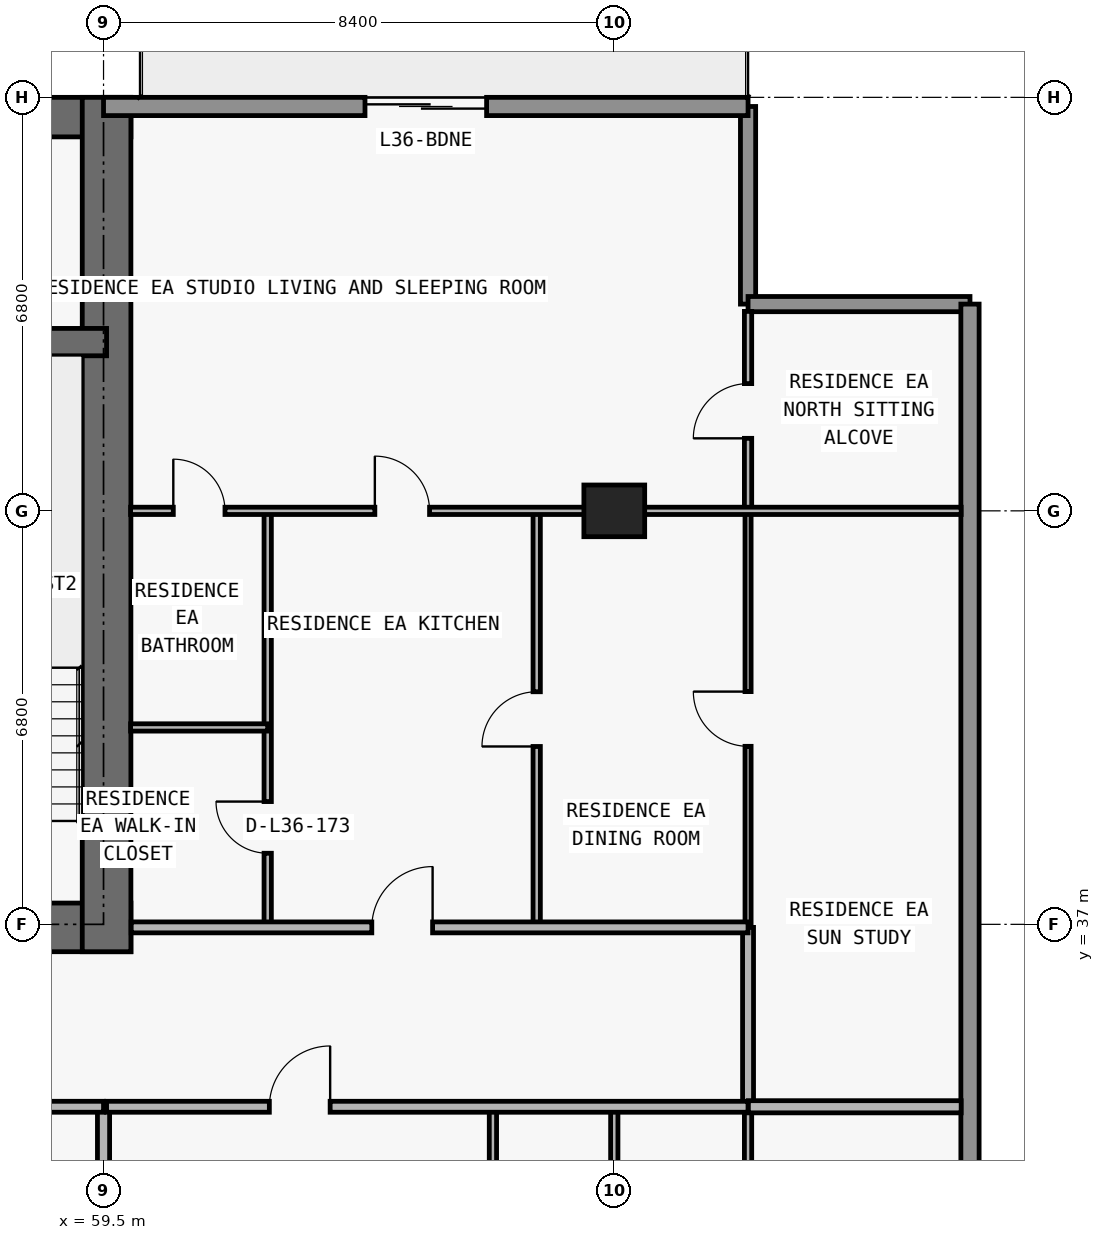
"""IFC4 building model, lengths in metres.
Left out: names, types, materials, properties, quantities, classifications, styles, units other than length and angle.
Written with IfcOpenShell. Run it as: python <this file> out.ifc"""

import sys

from ifc_helpers import new_model, si_unit, direction, frame, frame_2d, origin, origin_2d, place, context, subcontext, project, spatial, rectangle, extrude, element, fill, save


model = new_model("IFC4")
c1 = context("Model", 3, precision=1e-05, world=origin(), true_north=direction((0.0, 1.0)))
c2 = subcontext(c1, "Body", "Model", "MODEL_VIEW")
j1 = project(units=[si_unit("LENGTHUNIT", "METRE"), si_unit("PLANEANGLEUNIT", "RADIAN")], contexts=[c1])
p1 = place(None, origin())
s1 = spatial("IfcSite", under=j1, at=p1, CompositionType="ELEMENT")
p2 = place(p1, origin())
s2 = spatial("IfcBuilding", under=s1, at=p2, CompositionType="ELEMENT")
p3 = place(p2, frame((0.0, 0.0, 132.3)))
s3 = spatial("IfcBuildingStorey", under=s2, at=p3, CompositionType="ELEMENT", Elevation=132.3)
p4 = place(p3, frame((67.9, 43.8, 0.0), z_axis=(0.0, 0.0, 1.0), x_axis=(1.0, 0.0, 0.0)))
e1 = element("IfcColumn", 1, at=p4, inside=s3, PredefinedType="COLUMN", context=c2, shape_type="SweptSolid", body=[
    extrude(rectangle(XDim=1.0, YDim=0.85, at=origin_2d()), origin(), (0.0, 0.0, 1.0), 3.05),
])
p5 = place(p3, frame((17.85, 36.95, 0.0), z_axis=(0.0, 0.0, 1.0), x_axis=(1.0, 0.0, 0.0)))
e2 = element("IfcWall", 2, at=p5, inside=s3, PredefinedType="SHEAR", context=c2, shape_type="SweptSolid", body=[
    extrude(rectangle(XDim=42.1, YDim=0.8, at=frame_2d((21.05, 0.0))), origin(), (0.0, 0.0, 1.0), 3.05),
])
p6 = place(p5, frame((14.45, 0.0, 0.0)))
e3 = element("IfcOpeningElement", 3, at=p6, cuts=e2, PredefinedType="OPENING", context=c2, shape_type="SweptSolid", body=[
    extrude(rectangle(XDim=1.1, YDim=2.15, at=frame_2d((0.55, 1.075))), frame((0.0, 0.41, 0.0), z_axis=(0.0, -1.0, 0.0), x_axis=(1.0, 0.0, 0.0)), (0.0, 0.0, 1.0), 0.82),
])
p7 = place(p5, frame((6.3, 0.0, 0.0)))
e4 = element("IfcOpeningElement", 4, at=p7, cuts=e2, PredefinedType="OPENING", context=c2, shape_type="SweptSolid", body=[
    extrude(rectangle(XDim=1.05, YDim=2.15, at=frame_2d((0.525, 1.075))), frame((0.0, 0.41, 0.0), z_axis=(0.0, -1.0, 0.0), x_axis=(1.0, 0.0, 0.0)), (0.0, 0.0, 1.0), 0.82),
])
p8 = place(p5, frame((34.8, 0.0, 0.0)))
e5 = element("IfcOpeningElement", 5, at=p8, cuts=e2, PredefinedType="OPENING", context=c2, shape_type="SweptSolid", body=[
    extrude(rectangle(XDim=1.05, YDim=2.15, at=frame_2d((0.525, 1.075))), frame((0.0, 0.41, 0.0), z_axis=(0.0, -1.0, 0.0), x_axis=(1.0, 0.0, 0.0)), (0.0, 0.0, 1.0), 0.82),
])
p9 = place(p5, frame((10.913, 0.0, 0.0)))
e6 = element("IfcOpeningElement", 6, at=p9, cuts=e2, PredefinedType="OPENING", context=c2, shape_type="SweptSolid", body=[
    extrude(rectangle(XDim=1.05, YDim=2.15, at=frame_2d((0.525, 1.075))), frame((0.0, 0.41, 0.0), z_axis=(0.0, -1.0, 0.0), x_axis=(1.0, 0.0, 0.0)), (0.0, 0.0, 1.0), 0.82),
])
p10 = place(p5, frame((24.15, 0.0, 0.0)))
e7 = element("IfcOpeningElement", 7, at=p10, cuts=e2, PredefinedType="OPENING", context=c2, shape_type="SweptSolid", body=[
    extrude(rectangle(XDim=1.05, YDim=2.15, at=frame_2d((0.525, 1.075))), frame((0.0, 0.41, 0.0), z_axis=(0.0, -1.0, 0.0), x_axis=(1.0, 0.0, 0.0)), (0.0, 0.0, 1.0), 0.82),
])
p11 = place(p3, frame((17.85, 50.275, 0.0), z_axis=(0.0, 0.0, 1.0), x_axis=(1.0, 0.0, 0.0)))
e8 = element("IfcWall", 8, at=p11, inside=s3, PredefinedType="SHEAR", context=c2, shape_type="SweptSolid", body=[
    extrude(rectangle(XDim=42.1, YDim=0.65, at=frame_2d((21.05, 0.0))), origin(), (0.0, 0.0, 1.0), 3.05),
])
p12 = place(p3, frame((59.55, 36.55, 0.0), z_axis=(0.0, 0.0, 1.0), x_axis=(0.0, 1.0, 0.0)))
e9 = element("IfcWall", 9, at=p12, inside=s3, PredefinedType="SHEAR", context=c2, shape_type="SweptSolid", body=[
    extrude(rectangle(XDim=14.05, YDim=0.8, at=frame_2d((7.025, 0.0))), origin(), (0.0, 0.0, 1.0), 3.05),
])
p13 = place(p3, frame((18.25, 46.575, 0.0), z_axis=(0.0, 0.0, 1.0), x_axis=(1.0, 0.0, 0.0)))
e10 = element("IfcWall", 10, at=p13, inside=s3, PredefinedType="SHEAR", context=c2, shape_type="SweptSolid", body=[
    extrude(rectangle(XDim=41.3, YDim=0.45, at=frame_2d((20.65, 0.0))), origin(), (0.0, 0.0, 1.0), 3.05),
])
p14 = place(p13, frame((7.625, 0.0, 0.0)))
e11 = element("IfcOpeningElement", 11, at=p14, cuts=e10, PredefinedType="OPENING", context=c2, shape_type="SweptSolid", body=[
    extrude(rectangle(XDim=1.05, YDim=2.15, at=frame_2d((0.525, 1.075))), frame((0.0, 0.235, 0.0), z_axis=(0.0, -1.0, 0.0), x_axis=(1.0, 0.0, 0.0)), (0.0, 0.0, 1.0), 0.47),
])
p15 = place(p13, frame((32.675, 0.0, 0.0)))
e12 = element("IfcOpeningElement", 12, at=p15, cuts=e10, PredefinedType="OPENING", context=c2, shape_type="SweptSolid", body=[
    extrude(rectangle(XDim=1.05, YDim=2.15, at=frame_2d((0.525, 1.075))), frame((0.0, 0.235, 0.0), z_axis=(0.0, -1.0, 0.0), x_axis=(1.0, 0.0, 0.0)), (0.0, 0.0, 1.0), 0.47),
])
p16 = place(p3, frame((70.1, 50.45, 0.0), z_axis=(0.0, 0.0, 1.0), x_axis=(0.0, -1.0, 0.0)))
e13 = element("IfcWall", 13, at=p16, inside=s3, PredefinedType="ELEMENTEDWALL", context=c2, shape_type="SweptSolid", body=[
    extrude(rectangle(XDim=3.25, YDim=0.25, at=frame_2d((1.625, 0.0))), origin(), (0.0, 0.0, 1.0), 3.05),
])
p17 = place(p3, frame((70.1, 47.2, 0.0), z_axis=(0.0, 0.0, 1.0), x_axis=(1.0, 0.0, 0.0)))
e14 = element("IfcWall", 14, at=p17, inside=s3, PredefinedType="ELEMENTEDWALL", context=c2, shape_type="SweptSolid", body=[
    extrude(rectangle(XDim=3.65, YDim=0.25, at=frame_2d((1.825, 0.0))), origin(), (0.0, 0.0, 1.0), 3.05),
])
p18 = place(p3, frame((73.75, 47.2, 0.0), z_axis=(0.0, 0.0, 1.0), x_axis=(0.0, -1.0, 0.0)))
e15 = element("IfcWall", 15, at=p18, inside=s3, PredefinedType="STANDARD", context=c2, shape_type="SweptSolid", body=[
    extrude(rectangle(XDim=19.2, YDim=0.3, at=frame_2d((9.6, 0.0))), origin(), (0.0, 0.0, 1.0), 3.05),
])
p19 = place(p3, frame((59.5, 50.45, 0.0), z_axis=(0.0, 0.0, 1.0), x_axis=(1.0, 0.0, 0.0)))
e16 = element("IfcWall", 16, at=p19, inside=s3, PredefinedType="STANDARD", context=c2, shape_type="SweptSolid", body=[
    extrude(rectangle(XDim=10.6, YDim=0.3, at=frame_2d((5.3, 0.0))), origin(), (0.0, 0.0, 1.0), 3.05),
])
p20 = place(p19, frame((4.3, 0.0, 0.0)))
e17 = element("IfcOpeningElement", 17, at=p20, cuts=e16, PredefinedType="OPENING", context=c2, shape_type="SweptSolid", body=[
    extrude(rectangle(XDim=2.0, YDim=2.3, at=frame_2d((1.0, 1.15))), frame((0.0, 0.16, 0.0), z_axis=(0.0, -1.0, 0.0), x_axis=(1.0, 0.0, 0.0)), (0.0, 0.0, 1.0), 0.32),
])
p21 = place(p3, frame((59.5, 28.84, 0.0), z_axis=(0.0, 0.0, 1.0), x_axis=(0.0, 1.0, 0.0)))
e18 = element("IfcWall", 18, at=p21, inside=s3, PredefinedType="PARTITIONING", context=c2, shape_type="SweptSolid", body=[
    extrude(rectangle(XDim=5.16, YDim=0.2, at=frame_2d((2.58, 0.0))), origin(), (0.0, 0.0, 1.0), 2.174),
])
p22 = place(p3, frame((62.2, 36.95, 0.0), z_axis=(0.0, 0.0, 1.0), x_axis=(0.0, 1.0, 0.0)))
e19 = element("IfcWall", 19, at=p22, inside=s3, PredefinedType="PARTITIONING", context=c2, shape_type="SweptSolid", body=[
    extrude(rectangle(XDim=6.85, YDim=0.12, at=frame_2d((3.425, 0.0))), origin(), (0.0, 0.0, 1.0), 2.499),
])
p23 = place(p22, frame((1.219, 0.0, 0.0)))
e20 = element("IfcOpeningElement", 20, at=p23, cuts=e19, PredefinedType="OPENING", context=c2, shape_type="SweptSolid", body=[
    extrude(rectangle(XDim=0.85, YDim=2.1, at=frame_2d((0.425, 1.05))), frame((0.0, 0.07, 0.0), z_axis=(0.0, -1.0, 0.0), x_axis=(1.0, 0.0, 0.0)), (0.0, 0.0, 1.0), 0.14),
])
p24 = place(p3, frame((65.904, 28.84, 0.0), z_axis=(0.0, 0.0, 1.0), x_axis=(0.0, 1.0, 0.0)))
e21 = element("IfcWall", 21, at=p24, inside=s3, PredefinedType="PARTITIONING", context=c2, shape_type="SweptSolid", body=[
    extrude(rectangle(XDim=5.16, YDim=0.12, at=frame_2d((2.58, 0.0))), origin(), (0.0, 0.0, 1.0), 3.05),
])
p25 = place(p24, frame((2.155, 0.0, 0.0)))
e22 = element("IfcOpeningElement", 22, at=p25, cuts=e21, PredefinedType="OPENING", context=c2, shape_type="SweptSolid", body=[
    extrude(rectangle(XDim=0.85, YDim=2.1, at=frame_2d((0.425, 1.05))), frame((0.0, 0.07, 0.0), z_axis=(0.0, -1.0, 0.0), x_axis=(1.0, 0.0, 0.0)), (0.0, 0.0, 1.0), 0.14),
])
p26 = place(p3, frame((66.624, 36.95, 0.0), z_axis=(0.0, 0.0, 1.0), x_axis=(0.0, 1.0, 0.0)))
e23 = element("IfcWall", 23, at=p26, inside=s3, PredefinedType="PARTITIONING", context=c2, shape_type="SweptSolid", body=[
    extrude(rectangle(XDim=6.85, YDim=0.12, at=frame_2d((3.425, 0.0))), origin(), (0.0, 0.0, 1.0), 3.05),
])
p27 = place(p26, frame((2.975, 0.0, 0.0)))
e24 = element("IfcOpeningElement", 24, at=p27, cuts=e23, PredefinedType="OPENING", context=c2, shape_type="SweptSolid", body=[
    extrude(rectangle(XDim=0.9, YDim=2.15, at=frame_2d((0.45, 1.075))), frame((0.0, 0.07, 0.0), z_axis=(0.0, -1.0, 0.0), x_axis=(1.0, 0.0, 0.0)), (0.0, 0.0, 1.0), 0.14),
])
p28 = place(p3, frame((67.9, 28.84, 0.0), z_axis=(0.0, 0.0, 1.0), x_axis=(0.0, 1.0, 0.0)))
e25 = element("IfcWall", 25, at=p28, inside=s3, PredefinedType="PARTITIONING", context=c2, shape_type="SweptSolid", body=[
    extrude(rectangle(XDim=5.16, YDim=0.12, at=frame_2d((2.58, 0.0))), origin(), (0.0, 0.0, 1.0), 2.174),
])
p29 = place(p3, frame((70.1, 28.84, 0.0), z_axis=(0.0, 0.0, 1.0), x_axis=(0.0, 1.0, 0.0)))
e26 = element("IfcWall", 26, at=p29, inside=s3, PredefinedType="PARTITIONING", context=c2, shape_type="SweptSolid", body=[
    extrude(rectangle(XDim=5.16, YDim=0.12, at=frame_2d((2.58, 0.0))), origin(), (0.0, 0.0, 1.0), 3.05),
])
p30 = place(p3, frame((70.1, 34.005, 0.0), z_axis=(0.0, 0.0, 1.0), x_axis=(0.0, 1.0, 0.0)))
e27 = element("IfcWall", 27, at=p30, inside=s3, PredefinedType="PARTITIONING", context=c2, shape_type="SweptSolid", body=[
    extrude(rectangle(XDim=2.945, YDim=0.18, at=frame_2d((1.473, 0.0))), origin(), (0.0, 0.0, 1.0), 3.05),
])
p31 = place(p3, frame((70.1, 36.955, 0.0), z_axis=(0.0, 0.0, 1.0), x_axis=(0.0, 1.0, 0.0)))
e28 = element("IfcWall", 28, at=p31, inside=s3, PredefinedType="MOVABLE", context=c2, shape_type="SweptSolid", body=[
    extrude(rectangle(XDim=6.845, YDim=0.1, at=frame_2d((3.422, 0.0))), origin(), (0.0, 0.0, 1.0), 3.05),
])
p32 = place(p31, frame((2.972, 0.0, 0.0)))
e29 = element("IfcOpeningElement", 29, at=p32, cuts=e28, PredefinedType="OPENING", context=c2, shape_type="SweptSolid", body=[
    extrude(rectangle(XDim=0.9, YDim=2.15, at=frame_2d((0.45, 1.075))), frame((0.0, 0.06, 0.0), z_axis=(0.0, -1.0, 0.0), x_axis=(1.0, 0.0, 0.0)), (0.0, 0.0, 1.0), 0.12),
])
p33 = place(p3, frame((70.1, 43.805, 0.0), z_axis=(0.0, 0.0, 1.0), x_axis=(0.0, 1.0, 0.0)))
e30 = element("IfcWall", 30, at=p33, inside=s3, PredefinedType="PARTITIONING", context=c2, shape_type="SweptSolid", body=[
    extrude(rectangle(XDim=3.275, YDim=0.12, at=frame_2d((1.638, 0.0))), origin(), (0.0, 0.0, 1.0), 3.05),
])
p34 = place(p33, frame((1.188, 0.0, 0.0)))
e31 = element("IfcOpeningElement", 31, at=p34, cuts=e30, PredefinedType="OPENING", context=c2, shape_type="SweptSolid", body=[
    extrude(rectangle(XDim=0.9, YDim=2.15, at=frame_2d((0.45, 1.075))), frame((0.0, 0.07, 0.0), z_axis=(0.0, -1.0, 0.0), x_axis=(1.0, 0.0, 0.0)), (0.0, 0.0, 1.0), 0.14),
])
p35 = place(p3, frame((55.9, 34.0, 0.0), z_axis=(0.0, 0.0, 1.0), x_axis=(1.0, 0.0, 0.0)))
e32 = element("IfcWall", 32, at=p35, inside=s3, PredefinedType="PARTITIONING", context=c2, shape_type="SweptSolid", body=[
    extrude(rectangle(XDim=3.6, YDim=0.18, at=frame_2d((1.8, 0.0))), origin(), (0.0, 0.0, 1.0), 3.05),
])
p36 = place(p3, frame((59.55, 34.0, 0.0), z_axis=(0.0, 0.0, 1.0), x_axis=(1.0, 0.0, 0.0)))
e33 = element("IfcWall", 33, at=p36, inside=s3, PredefinedType="PARTITIONING", context=c2, shape_type="SweptSolid", body=[
    extrude(rectangle(XDim=10.55, YDim=0.18, at=frame_2d((5.275, 0.0))), origin(), (0.0, 0.0, 1.0), 3.05),
])
p37 = place(p36, frame((2.677, 0.0, 0.0)))
e34 = element("IfcOpeningElement", 34, at=p37, cuts=e33, PredefinedType="OPENING", context=c2, shape_type="SweptSolid", body=[
    extrude(rectangle(XDim=1.0, YDim=2.2, at=frame_2d((0.5, 1.1))), frame((0.0, 0.1, 0.0), z_axis=(0.0, -1.0, 0.0), x_axis=(1.0, 0.0, 0.0)), (0.0, 0.0, 1.0), 0.2),
])
p38 = place(p3, frame((70.105, 34.0, 0.0), z_axis=(0.0, 0.0, 1.0), x_axis=(1.0, 0.0, 0.0)))
e35 = element("IfcWall", 35, at=p38, inside=s3, PredefinedType="PARTITIONING", context=c2, shape_type="SweptSolid", body=[
    extrude(rectangle(XDim=3.5, YDim=0.2, at=frame_2d((1.75, 0.0))), origin(), (0.0, 0.0, 1.0), 3.05),
])
p39 = place(p3, frame((59.955, 36.95, 0.0), z_axis=(0.0, 0.0, 1.0), x_axis=(1.0, 0.0, 0.0)))
e36 = element("IfcWall", 36, at=p39, inside=s3, PredefinedType="PARTITIONING", context=c2, shape_type="SweptSolid", body=[
    extrude(rectangle(XDim=10.145, YDim=0.18, at=frame_2d((5.073, 0.0))), origin(), (0.0, 0.0, 1.0), 3.05),
])
p40 = place(p39, frame((3.957, 0.0, 0.0)))
e37 = element("IfcOpeningElement", 37, at=p40, cuts=e36, PredefinedType="OPENING", context=c2, shape_type="SweptSolid", body=[
    extrude(rectangle(XDim=1.0, YDim=2.2, at=frame_2d((0.5, 1.1))), frame((0.0, 0.1, 0.0), z_axis=(0.0, -1.0, 0.0), x_axis=(1.0, 0.0, 0.0)), (0.0, 0.0, 1.0), 0.2),
])
p41 = place(p3, frame((59.945, 40.238, 0.0), z_axis=(0.0, 0.0, 1.0), x_axis=(1.0, 0.0, 0.0)))
e38 = element("IfcWall", 38, at=p41, inside=s3, PredefinedType="PARTITIONING", context=c2, shape_type="SweptSolid", body=[
    extrude(rectangle(XDim=2.255, YDim=0.12, at=frame_2d((1.127, 0.0))), origin(), (0.0, 0.0, 1.0), 3.05),
])
p42 = place(p3, frame((59.945, 43.8, 0.0), z_axis=(0.0, 0.0, 1.0), x_axis=(1.0, 0.0, 0.0)))
e39 = element("IfcWall", 39, at=p42, inside=s3, PredefinedType="PARTITIONING", context=c2, shape_type="SweptSolid", body=[
    extrude(rectangle(XDim=13.66, YDim=0.12, at=frame_2d((6.83, 0.0))), origin(), (0.0, 0.0, 1.0), 2.339),
])
p43 = place(p42, frame((4.017, 0.0, 0.0)))
e40 = element("IfcOpeningElement", 40, at=p43, cuts=e39, PredefinedType="OPENING", context=c2, shape_type="SweptSolid", body=[
    extrude(rectangle(XDim=0.9, YDim=2.15, at=frame_2d((0.45, 1.075))), frame((0.0, 0.07, 0.0), z_axis=(0.0, -1.0, 0.0), x_axis=(1.0, 0.0, 0.0)), (0.0, 0.0, 1.0), 0.14),
])
p44 = place(p42, frame((0.702, 0.0, 0.0)))
e41 = element("IfcOpeningElement", 41, at=p44, cuts=e39, PredefinedType="OPENING", context=c2, shape_type="SweptSolid", body=[
    extrude(rectangle(XDim=0.85, YDim=2.1, at=frame_2d((0.425, 1.05))), frame((0.0, 0.07, 0.0), z_axis=(0.0, -1.0, 0.0), x_axis=(1.0, 0.0, 0.0)), (0.0, 0.0, 1.0), 0.14),
])
p45 = place(p20, origin())
e42 = element("IfcDoor", 42, at=p45, inside=s3, OperationType="DOUBLE_DOOR_SLIDING", PredefinedType="DOOR", context=c2, shape_type="SweptSolid", body=[
    extrude(rectangle(XDim=2.0, YDim=2.3, at=frame_2d((1.0, 1.15))), frame((0.0, 0.025, 0.0), z_axis=(0.0, -1.0, 0.0), x_axis=(1.0, 0.0, 0.0)), (0.0, 0.0, 1.0), 0.05),
])
fill(e17, e42)
p46 = place(p37, origin())
e43 = element("IfcDoor", 43, at=p46, inside=s3, OperationType="SINGLE_SWING_RIGHT", PredefinedType="DOOR", context=c2, shape_type="SweptSolid", body=[
    extrude(rectangle(XDim=1.0, YDim=2.2, at=frame_2d((0.5, 1.1))), frame((0.0, 0.025, 0.0), z_axis=(0.0, -1.0, 0.0), x_axis=(1.0, 0.0, 0.0)), (0.0, 0.0, 1.0), 0.05),
])
fill(e34, e43)
p47 = place(p27, origin())
e44 = element("IfcDoor", 44, at=p47, inside=s3, OperationType="SINGLE_SWING_LEFT", PredefinedType="DOOR", context=c2, shape_type="SweptSolid", body=[
    extrude(rectangle(XDim=0.9, YDim=2.15, at=frame_2d((0.45, 1.075))), frame((0.0, 0.025, 0.0), z_axis=(0.0, -1.0, 0.0), x_axis=(1.0, 0.0, 0.0)), (0.0, 0.0, 1.0), 0.05),
])
fill(e24, e44)
p48 = place(p40, origin())
e45 = element("IfcDoor", 45, at=p48, inside=s3, OperationType="SINGLE_SWING_RIGHT", PredefinedType="DOOR", context=c2, shape_type="SweptSolid", body=[
    extrude(rectangle(XDim=1.0, YDim=2.2, at=frame_2d((0.5, 1.1))), frame((0.0, 0.025, 0.0), z_axis=(0.0, -1.0, 0.0), x_axis=(1.0, 0.0, 0.0)), (0.0, 0.0, 1.0), 0.05),
])
fill(e37, e45)
p49 = place(p43, origin())
e46 = element("IfcDoor", 46, at=p49, inside=s3, OperationType="SINGLE_SWING_LEFT", PredefinedType="DOOR", context=c2, shape_type="SweptSolid", body=[
    extrude(rectangle(XDim=0.9, YDim=2.15, at=frame_2d((0.45, 1.075))), frame((0.0, 0.025, 0.0), z_axis=(0.0, -1.0, 0.0), x_axis=(1.0, 0.0, 0.0)), (0.0, 0.0, 1.0), 0.05),
])
fill(e40, e46)
p50 = place(p23, origin())
e47 = element("IfcDoor", 47, at=p50, inside=s3, OperationType="SINGLE_SWING_RIGHT", PredefinedType="DOOR", context=c2, shape_type="SweptSolid", body=[
    extrude(rectangle(XDim=0.85, YDim=2.1, at=frame_2d((0.425, 1.05))), frame((0.0, 0.025, 0.0), z_axis=(0.0, -1.0, 0.0), x_axis=(1.0, 0.0, 0.0)), (0.0, 0.0, 1.0), 0.05),
])
fill(e20, e47)
p51 = place(p44, origin())
e48 = element("IfcDoor", 48, at=p51, inside=s3, OperationType="SINGLE_SWING_LEFT", PredefinedType="DOOR", context=c2, shape_type="SweptSolid", body=[
    extrude(rectangle(XDim=0.85, YDim=2.1, at=frame_2d((0.425, 1.05))), frame((0.0, 0.025, 0.0), z_axis=(0.0, -1.0, 0.0), x_axis=(1.0, 0.0, 0.0)), (0.0, 0.0, 1.0), 0.05),
])
fill(e41, e48)
p52 = place(p32, origin())
e49 = element("IfcDoor", 49, at=p52, inside=s3, OperationType="SINGLE_SWING_RIGHT", PredefinedType="DOOR", context=c2, shape_type="SweptSolid", body=[
    extrude(rectangle(XDim=0.9, YDim=2.15, at=frame_2d((0.45, 1.075))), frame((0.0, 0.025, 0.0), z_axis=(0.0, -1.0, 0.0), x_axis=(1.0, 0.0, 0.0)), (0.0, 0.0, 1.0), 0.05),
])
fill(e29, e49)
p53 = place(p34, origin())
e50 = element("IfcDoor", 50, at=p53, inside=s3, OperationType="SINGLE_SWING_LEFT", PredefinedType="DOOR", context=c2, shape_type="SweptSolid", body=[
    extrude(rectangle(XDim=0.9, YDim=2.15, at=frame_2d((0.45, 1.075))), frame((0.0, 0.025, 0.0), z_axis=(0.0, -1.0, 0.0), x_axis=(1.0, 0.0, 0.0)), (0.0, 0.0, 1.0), 0.05),
])
fill(e31, e50)
save(model, sys.argv[1])
